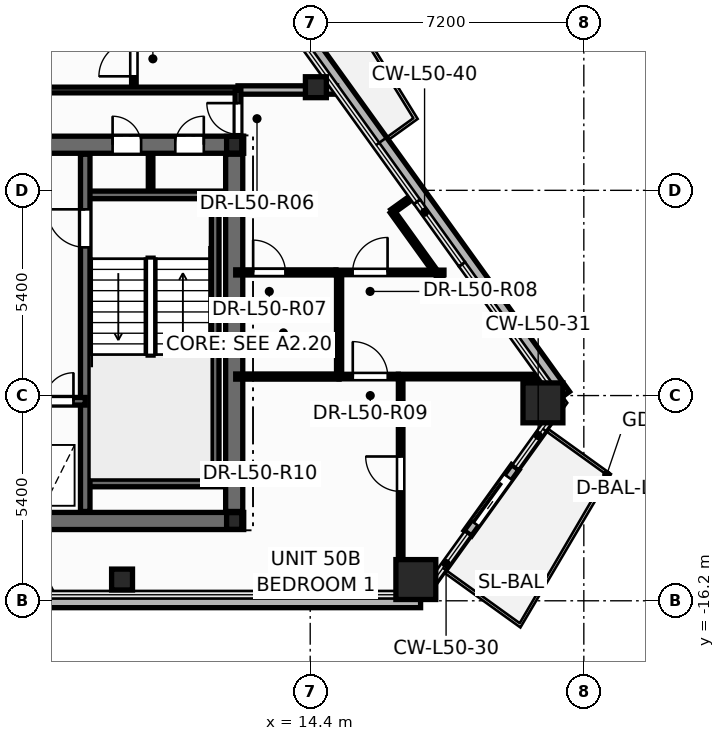
"""IFC4 building model, lengths in metres.
Left out: names, types, materials, properties, quantities, classifications, styles, units other than length and angle.
Written with IfcOpenShell. Run it as: python <this file> out.ifc"""

import sys

from ifc_helpers import new_model, si_unit, direction, frame, frame_2d, origin, origin_2d, place, context, subcontext, project, spatial, rectangle, hollow_rectangle, hollow_circle, i_section, extrude, element, fill, save


model = new_model("IFC4")
c1 = context("Model", 3, precision=1e-05, world=origin(), true_north=direction((0.0, 1.0)))
c2 = subcontext(c1, "Body", "Model", "MODEL_VIEW")
j1 = project(units=[si_unit("LENGTHUNIT", "METRE"), si_unit("PLANEANGLEUNIT", "RADIAN")], contexts=[c1])
p1 = place(None, origin())
s1 = spatial("IfcSite", under=j1, at=p1, CompositionType="ELEMENT")
p2 = place(p1, origin())
s2 = spatial("IfcBuilding", under=s1, at=p2, CompositionType="ELEMENT")
p3 = place(p2, frame((0.0, 0.0, 192.9)))
s3 = spatial("IfcBuildingStorey", under=s2, at=p3, CompositionType="ELEMENT", Elevation=192.9)
for number, where, z_axis, x_axis in (
    (1, (17.18, -15.641, 0.0), (0.0, 0.0, 1.0), (1.0, 0.0, 0.0)),
    (2, (20.524, -10.992, 0.0), (0.0, 0.0, 1.0), (1.0, 0.0, 0.0)),
):
    element("IfcColumn", number, at=place(p3, frame(where, z_axis=z_axis, x_axis=x_axis)), inside=s3, PredefinedType="COLUMN", context=c2, shape_type="SweptSolid", body=[
        extrude(hollow_rectangle(XDim=1.05, YDim=1.05, WallThickness=0.045, at=origin_2d()), origin(), (0.0, 0.0, 1.0), 3.6),
    ])
for number, where, z_axis, x_axis in (
    (3, (9.449, -15.641, 0.0), (0.0, 0.0, 1.0), (1.0, 0.0, 0.0)),
    (4, (14.549, -2.686, 0.0), (0.0, 0.0, 1.0), (1.0, 0.0, 0.0)),
):
    element("IfcColumn", number, at=place(p3, frame(where, z_axis=z_axis, x_axis=x_axis)), inside=s3, PredefinedType="COLUMN", context=c2, shape_type="SweptSolid", body=[
        extrude(hollow_circle(Radius=0.275, WallThickness=0.024, at=origin_2d()), origin(), (0.0, 0.0, 1.0), 3.6),
    ])
for number, where, z_axis, x_axis in (
    (5, (12.4, -14.1, 0.0), (0.0, 0.0, 1.0), (1.0, 0.0, 0.0)),
    (6, (12.4, -4.2, 0.0), (0.0, 0.0, 1.0), (1.0, 0.0, 0.0)),
):
    element("IfcColumn", number, at=place(p3, frame(where, z_axis=z_axis, x_axis=x_axis)), inside=s3, PredefinedType="COLUMN", context=c2, shape_type="SweptSolid", body=[
        extrude(i_section(OverallWidth=0.4, OverallDepth=0.44, WebThickness=0.028, FlangeThickness=0.04, at=origin_2d()), origin(), (0.0, 0.0, 1.0), 3.6),
    ])
p4 = place(p3, frame((-17.305, -16.201, -0.2), z_axis=(0.0, 0.0, 1.0), x_axis=(1.0, 0.0, 0.0)))
e7 = element("IfcWall", 7, at=p4, inside=s3, PredefinedType="PARAPET", context=c2, shape_type="SweptSolid", body=[
    extrude(rectangle(XDim=34.609, YDim=0.36, at=frame_2d((17.305, 0.0))), origin(), (0.0, 0.0, 1.0), 0.38),
])
p5 = place(p3, frame((21.077, -10.801, -0.2), z_axis=(0.0, 0.0, 1.0), x_axis=(-0.583976071479, 0.811770871576, 0.0)))
e8 = element("IfcWall", 8, at=p5, inside=s3, PredefinedType="PARAPET", context=c2, shape_type="SweptSolid", body=[
    extrude(rectangle(XDim=12.115, YDim=0.36, at=frame_2d((6.058, 0.0))), origin(), (0.0, 0.0, 1.0), 0.38),
])
p6 = place(p3, frame((18.548, -14.424, -0.015), z_axis=(0.0, 0.0, 1.0), x_axis=(0.583965085393, 0.811778774693, 0.0)))
e9 = element("IfcWall", 9, at=p6, inside=s3, PredefinedType="STANDARD", context=c2, shape_type="SweptSolid", body=[
    extrude(rectangle(XDim=2.14, YDim=0.24, at=frame_2d((1.07, 0.0))), origin(), (0.0, 0.0, 1.0), 2.807),
])
p7 = place(p6, frame((0.32, 0.0, 0.015)))
e10 = element("IfcOpeningElement", 10, at=p7, cuts=e9, PredefinedType="OPENING", context=c2, shape_type="SweptSolid", body=[
    extrude(rectangle(XDim=1.506, YDim=2.204, at=frame_2d((0.75, 1.102))), frame((0.0, 0.13, 0.0), z_axis=(0.0, -1.0, 0.0), x_axis=(1.0, 0.0, 0.0)), (0.0, 0.0, 1.0), 0.26),
])
p8 = place(p3, frame((10.2, -5.52, 0.0), z_axis=(0.0, 0.0, 1.0), x_axis=(0.0, 1.0, 0.0)))
e11 = element("IfcWall", 11, at=p8, inside=s3, PredefinedType="PARTITIONING", context=c2, shape_type="SweptSolid", body=[
    extrude(rectangle(XDim=1.12, YDim=0.12, at=frame_2d((0.56, 0.0))), origin(), (0.0, 0.0, 1.0), 3.35),
])
p9 = place(p3, frame((-12.65, -14.1, 0.0), z_axis=(0.0, 0.0, 1.0), x_axis=(1.0, 0.0, 0.0)))
e12 = element("IfcWall", 12, at=p9, inside=s3, PredefinedType="SHEAR", context=c2, shape_type="SweptSolid", body=[
    extrude(rectangle(XDim=25.3, YDim=0.45, at=frame_2d((12.65, 0.0))), origin(), (0.0, 0.0, 1.0), 3.6),
])
p10 = place(p3, frame((-12.65, -4.2, 0.0), z_axis=(0.0, 0.0, 1.0), x_axis=(1.0, 0.0, 0.0)))
e13 = element("IfcWall", 13, at=p10, inside=s3, PredefinedType="SHEAR", context=c2, shape_type="SweptSolid", body=[
    extrude(rectangle(XDim=25.3, YDim=0.45, at=frame_2d((12.65, 0.0))), origin(), (0.0, 0.0, 1.0), 3.6),
])
p11 = place(p10, frame((0.95, 0.0, 0.0)))
e14 = element("IfcOpeningElement", 14, at=p11, cuts=e13, PredefinedType="OPENING", context=c2, shape_type="SweptSolid", body=[
    extrude(rectangle(XDim=0.756, YDim=2.054, at=frame_2d((0.375, 1.027))), frame((0.0, 0.235, 0.0), z_axis=(0.0, -1.0, 0.0), x_axis=(1.0, 0.0, 0.0)), (0.0, 0.0, 1.0), 0.47),
])
p12 = place(p10, frame((2.6, 0.0, 0.0)))
e15 = element("IfcOpeningElement", 15, at=p12, cuts=e13, PredefinedType="OPENING", context=c2, shape_type="SweptSolid", body=[
    extrude(rectangle(XDim=0.756, YDim=2.054, at=frame_2d((0.375, 1.027))), frame((0.0, 0.235, 0.0), z_axis=(0.0, -1.0, 0.0), x_axis=(1.0, 0.0, 0.0)), (0.0, 0.0, 1.0), 0.47),
])
p13 = place(p10, frame((21.85, 0.0, 0.0)))
e16 = element("IfcOpeningElement", 16, at=p13, cuts=e13, PredefinedType="OPENING", context=c2, shape_type="SweptSolid", body=[
    extrude(rectangle(XDim=0.756, YDim=2.054, at=frame_2d((0.375, 1.027))), frame((0.0, 0.235, 0.0), z_axis=(0.0, -1.0, 0.0), x_axis=(1.0, 0.0, 0.0)), (0.0, 0.0, 1.0), 0.47),
])
p14 = place(p10, frame((23.5, 0.0, 0.0)))
e17 = element("IfcOpeningElement", 17, at=p14, cuts=e13, PredefinedType="OPENING", context=c2, shape_type="SweptSolid", body=[
    extrude(rectangle(XDim=0.756, YDim=2.054, at=frame_2d((0.375, 1.027))), frame((0.0, 0.235, 0.0), z_axis=(0.0, -1.0, 0.0), x_axis=(1.0, 0.0, 0.0)), (0.0, 0.0, 1.0), 0.47),
])
p15 = place(p10, frame((5.85, 0.0, 0.0)))
e18 = element("IfcOpeningElement", 18, at=p15, cuts=e13, PredefinedType="OPENING", context=c2, shape_type="SweptSolid", body=[
    extrude(rectangle(XDim=1.006, YDim=2.104, at=frame_2d((0.5, 1.052))), frame((0.0, 0.235, 0.0), z_axis=(0.0, -1.0, 0.0), x_axis=(1.0, 0.0, 0.0)), (0.0, 0.0, 1.0), 0.47),
])
p16 = place(p10, frame((10.35, 0.0, 0.0)))
e19 = element("IfcOpeningElement", 19, at=p16, cuts=e13, PredefinedType="OPENING", context=c2, shape_type="SweptSolid", body=[
    extrude(rectangle(XDim=1.406, YDim=2.154, at=frame_2d((0.7, 1.077))), frame((0.0, 0.235, 0.0), z_axis=(0.0, -1.0, 0.0), x_axis=(1.0, 0.0, 0.0)), (0.0, 0.0, 1.0), 0.47),
])
p17 = place(p10, frame((18.45, 0.0, 0.0)))
e20 = element("IfcOpeningElement", 20, at=p17, cuts=e13, PredefinedType="OPENING", context=c2, shape_type="SweptSolid", body=[
    extrude(rectangle(XDim=1.006, YDim=2.104, at=frame_2d((0.5, 1.052))), frame((0.0, 0.235, 0.0), z_axis=(0.0, -1.0, 0.0), x_axis=(1.0, 0.0, 0.0)), (0.0, 0.0, 1.0), 0.47),
])
for number, where, z_axis, x_axis in (
    (21, (8.48, -5.52, 0.0), (0.0, 0.0, 1.0), (1.0, 0.0, 0.0)),
    (22, (8.48, -13.1, 0.0), (0.0, 0.0, 1.0), (1.0, 0.0, 0.0)),
):
    element("IfcWall", number, at=place(p3, frame(where, z_axis=z_axis, x_axis=x_axis)), inside=s3, PredefinedType="SOLIDWALL", context=c2, shape_type="SweptSolid", body=[
        extrude(rectangle(XDim=3.87, YDim=0.2, at=frame_2d((1.935, 0.0))), origin(), (0.0, 0.0, 1.0), 3.6),
    ])
p18 = place(p3, frame((11.9, -13.1, 0.0), z_axis=(0.0, 0.0, 1.0), x_axis=(0.0, 1.0, 0.0)))
e23 = element("IfcWall", 23, at=p18, inside=s3, PredefinedType="SOLIDWALL", context=c2, shape_type="SweptSolid", body=[
    extrude(rectangle(XDim=7.58, YDim=0.2, at=frame_2d((3.79, 0.0))), origin(), (0.0, 0.0, 1.0), 3.6),
])
p19 = place(p3, frame((8.48, -13.85, 0.0), z_axis=(0.0, 0.0, 1.0), x_axis=(0.0, 1.0, 0.0)))
e24 = element("IfcWall", 24, at=p19, inside=s3, PredefinedType="SHEAR", context=c2, shape_type="SweptSolid", body=[
    extrude(rectangle(XDim=9.4, YDim=0.25, at=frame_2d((4.7, 0.0))), origin(), (0.0, 0.0, 1.0), 3.6),
])
p20 = place(p19, frame((6.95, 0.0, 0.0)))
e25 = element("IfcOpeningElement", 25, at=p20, cuts=e24, PredefinedType="OPENING", context=c2, shape_type="SweptSolid", body=[
    extrude(rectangle(XDim=1.006, YDim=2.104, at=frame_2d((0.5, 1.052))), frame((0.0, 0.135, 0.0), z_axis=(0.0, -1.0, 0.0), x_axis=(1.0, 0.0, 0.0)), (0.0, 0.0, 1.0), 0.27),
])
p21 = place(p3, frame((5.12, -10.95, 0.0), z_axis=(0.0, 0.0, 1.0), x_axis=(1.0, 0.0, 0.0)))
e26 = element("IfcWall", 26, at=p21, inside=s3, PredefinedType="SOLIDWALL", context=c2, shape_type="SweptSolid", body=[
    extrude(rectangle(XDim=3.36, YDim=0.2, at=frame_2d((1.68, 0.0))), origin(), (0.0, 0.0, 1.0), 3.6),
])
p22 = place(p21, frame((0.42, 0.0, 0.0)))
e27 = element("IfcOpeningElement", 27, at=p22, cuts=e26, PredefinedType="OPENING", context=c2, shape_type="SweptSolid", body=[
    extrude(rectangle(XDim=1.106, YDim=2.104, at=frame_2d((0.55, 1.052))), frame((0.0, 0.11, 0.0), z_axis=(0.0, -1.0, 0.0), x_axis=(1.0, 0.0, 0.0)), (0.0, 0.0, 1.0), 0.22),
])
p23 = place(p21, frame((2.3, 0.0, 0.0)))
e28 = element("IfcOpeningElement", 28, at=p23, cuts=e26, PredefinedType="OPENING", context=c2, shape_type="SweptSolid", body=[
    extrude(rectangle(XDim=0.756, YDim=2.054, at=frame_2d((0.375, 1.027))), frame((0.0, 0.11, 0.0), z_axis=(0.0, -1.0, 0.0), x_axis=(1.0, 0.0, 0.0)), (0.0, 0.0, 1.0), 0.22),
])
p24 = place(p3, frame((12.4, -13.85, 0.0), z_axis=(0.0, 0.0, 1.0), x_axis=(0.0, 1.0, 0.0)))
e29 = element("IfcWall", 29, at=p24, inside=s3, PredefinedType="SHEAR", context=c2, shape_type="SweptSolid", body=[
    extrude(rectangle(XDim=9.4, YDim=0.45, at=frame_2d((4.7, 0.0))), origin(), (0.0, 0.0, 1.0), 3.6),
])
p25 = place(p3, frame((9.76, -2.76, 0.0), z_axis=(0.0, 0.0, 1.0), x_axis=(0.0, 1.0, 0.0)))
e30 = element("IfcWall", 30, at=p25, inside=s3, PredefinedType="PARTITIONING", context=c2, shape_type="SweptSolid", body=[
    extrude(rectangle(XDim=7.416, YDim=0.12, at=frame_2d((3.708, 0.0))), origin(), (0.0, 0.0, 1.0), 2.625),
])
p26 = place(p25, frame((0.36, 0.0, 0.0)))
e31 = element("IfcOpeningElement", 31, at=p26, cuts=e30, PredefinedType="OPENING", context=c2, shape_type="SweptSolid", body=[
    extrude(rectangle(XDim=0.926, YDim=2.104, at=frame_2d((0.46, 1.052))), frame((0.0, 0.07, 0.0), z_axis=(0.0, -1.0, 0.0), x_axis=(1.0, 0.0, 0.0)), (0.0, 0.0, 1.0), 0.14),
])
p27 = place(p3, frame((16.78, -16.041, 0.0), z_axis=(0.0, 0.0, 1.0), x_axis=(0.0, 1.0, 0.0)))
e32 = element("IfcWall", 32, at=p27, inside=s3, PredefinedType="PARTITIONING", context=c2, shape_type="SweptSolid", body=[
    extrude(rectangle(XDim=5.741, YDim=0.12, at=frame_2d((2.871, 0.0))), origin(), (0.0, 0.0, 1.0), 2.792),
])
p28 = place(p27, frame((2.718, 0.0, 0.0)))
e33 = element("IfcOpeningElement", 33, at=p28, cuts=e32, PredefinedType="OPENING", context=c2, shape_type="SweptSolid", body=[
    extrude(rectangle(XDim=0.926, YDim=2.104, at=frame_2d((0.46, 1.052))), frame((0.0, 0.07, 0.0), z_axis=(0.0, -1.0, 0.0), x_axis=(1.0, 0.0, 0.0)), (0.0, 0.0, 1.0), 0.14),
])
p29 = place(p3, frame((-4.318, -2.76, 0.0), z_axis=(0.0, 0.0, 1.0), x_axis=(1.0, 0.0, 0.0)))
e34 = element("IfcWall", 34, at=p29, inside=s3, PredefinedType="PARTITIONING", context=c2, shape_type="SweptSolid", body=[
    extrude(rectangle(XDim=16.818, YDim=0.15, at=frame_2d((8.409, 0.0))), origin(), (0.0, 0.0, 1.0), 2.325),
])
p30 = place(p3, frame((16.72, -10.3, 0.0), z_axis=(0.0, 0.0, 1.0), x_axis=(1.0, 0.0, 0.0)))
e35 = element("IfcWall", 35, at=p30, inside=s3, PredefinedType="PARTITIONING", context=c2, shape_type="SweptSolid", body=[
    extrude(rectangle(XDim=3.799, YDim=0.12, at=frame_2d((1.899, 0.0))), origin(), (0.0, 0.0, 1.0), 2.325),
])
p31 = place(p3, frame((15.08, -7.56, 0.0), z_axis=(0.0, 0.0, 1.0), x_axis=(1.0, 0.0, 0.0)))
e36 = element("IfcWall", 36, at=p31, inside=s3, PredefinedType="PARTITIONING", context=c2, shape_type="SweptSolid", body=[
    extrude(rectangle(XDim=2.84, YDim=0.12, at=frame_2d((1.42, 0.0))), origin(), (0.0, 0.0, 1.0), 2.325),
])
p32 = place(p31, frame((0.436, 0.0, 0.0)))
e37 = element("IfcOpeningElement", 37, at=p32, cuts=e36, PredefinedType="OPENING", context=c2, shape_type="SweptSolid", body=[
    extrude(rectangle(XDim=0.926, YDim=2.104, at=frame_2d((0.46, 1.052))), frame((0.0, 0.07, 0.0), z_axis=(0.0, -1.0, 0.0), x_axis=(1.0, 0.0, 0.0)), (0.0, 0.0, 1.0), 0.14),
])
p33 = place(p3, frame((12.44, -7.56, 0.0), z_axis=(0.0, 0.0, 1.0), x_axis=(1.0, 0.0, 0.0)))
e38 = element("IfcWall", 38, at=p33, inside=s3, PredefinedType="PARTITIONING", context=c2, shape_type="SweptSolid", body=[
    extrude(rectangle(XDim=2.638, YDim=0.135, at=frame_2d((1.319, 0.0))), origin(), (0.0, 0.0, 1.0), 2.792),
])
p34 = place(p33, frame((0.458, 0.0, 0.0)))
e39 = element("IfcOpeningElement", 39, at=p34, cuts=e38, PredefinedType="OPENING", context=c2, shape_type="SweptSolid", body=[
    extrude(rectangle(XDim=0.856, YDim=2.104, at=frame_2d((0.425, 1.052))), frame((0.0, 0.078, 0.0), z_axis=(0.0, -1.0, 0.0), x_axis=(1.0, 0.0, 0.0)), (0.0, 0.0, 1.0), 0.155),
])
p35 = place(p3, frame((15.16, -10.3, 0.0), z_axis=(0.0, 0.0, 1.0), x_axis=(0.0, 1.0, 0.0)))
e40 = element("IfcWall", 40, at=p35, inside=s3, PredefinedType="PARTITIONING", context=c2, shape_type="SweptSolid", body=[
    extrude(rectangle(XDim=2.74, YDim=0.135, at=frame_2d((1.37, 0.0))), origin(), (0.0, 0.0, 1.0), 3.35),
])
p36 = place(p3, frame((12.44, -10.3, 0.0), z_axis=(0.0, 0.0, 1.0), x_axis=(1.0, 0.0, 0.0)))
e41 = element("IfcWall", 41, at=p36, inside=s3, PredefinedType="PARTITIONING", context=c2, shape_type="SweptSolid", body=[
    extrude(rectangle(XDim=2.72, YDim=0.135, at=frame_2d((1.36, 0.0))), origin(), (0.0, 0.0, 1.0), 2.792),
])
p37 = place(p3, frame((12.5, -2.76, 0.0), z_axis=(0.0, 0.0, 1.0), x_axis=(1.0, 0.0, 0.0)))
e42 = element("IfcWall", 42, at=p37, inside=s3, PredefinedType="PARTITIONING", context=c2, shape_type="SweptSolid", body=[
    extrude(rectangle(XDim=2.595, YDim=0.22, at=frame_2d((1.297, 0.0))), origin(), (0.0, 0.0, 1.0), 2.625),
])
p38 = place(p3, frame((17.945, -7.886, 0.0), z_axis=(0.0, 0.0, 1.0), x_axis=(-0.583963896956, 0.811779629611, 0.0)))
e43 = element("IfcWall", 43, at=p38, inside=s3, PredefinedType="PARTITIONING", context=c2, shape_type="SweptSolid", body=[
    extrude(rectangle(XDim=2.378, YDim=0.12, at=frame_2d((1.189, 0.0))), origin(), (0.0, 0.0, 1.0), 3.35),
])
p39 = place(p3, frame((15.16, -10.3, 0.0), z_axis=(0.0, 0.0, 1.0), x_axis=(1.0, 0.0, 0.0)))
e44 = element("IfcWall", 44, at=p39, inside=s3, PredefinedType="PARTITIONING", context=c2, shape_type="SweptSolid", body=[
    extrude(rectangle(XDim=1.558, YDim=0.12, at=frame_2d((0.779, 0.0))), origin(), (0.0, 0.0, 1.0), 3.35),
])
p40 = place(p39, frame((0.36, 0.0, 0.0)))
e45 = element("IfcOpeningElement", 45, at=p40, cuts=e44, PredefinedType="OPENING", context=c2, shape_type="SweptSolid", body=[
    extrude(rectangle(XDim=0.926, YDim=2.104, at=frame_2d((0.46, 1.052))), frame((0.0, 0.07, 0.0), z_axis=(0.0, -1.0, 0.0), x_axis=(1.0, 0.0, 0.0)), (0.0, 0.0, 1.0), 0.14),
])
p41 = place(p3, frame((12.5, -4.24, 0.0), z_axis=(0.0, 0.0, 1.0), x_axis=(0.0, 1.0, 0.0)))
e46 = element("IfcWall", 46, at=p41, inside=s3, PredefinedType="PARTITIONING", context=c2, shape_type="SweptSolid", body=[
    extrude(rectangle(XDim=1.48, YDim=0.15, at=frame_2d((0.74, 0.0))), origin(), (0.0, 0.0, 1.0), 2.325),
])
p42 = place(p41, frame((0.315, 0.0, 0.0)))
e47 = element("IfcOpeningElement", 47, at=p42, cuts=e46, PredefinedType="OPENING", context=c2, shape_type="SweptSolid", body=[
    extrude(rectangle(XDim=0.826, YDim=2.104, at=frame_2d((0.41, 1.052))), frame((0.0, 0.085, 0.0), z_axis=(0.0, -1.0, 0.0), x_axis=(1.0, 0.0, 0.0)), (0.0, 0.0, 1.0), 0.17),
])
p43 = place(p3, frame((18.824, -7.961, 0.0), z_axis=(0.0, 0.0, 1.0), x_axis=(-0.996387556444, 0.084922537432, 0.0)))
e48 = element("IfcWall", 48, at=p43, inside=s3, PredefinedType="PARTITIONING", context=c2, shape_type="SweptSolid", body=[
    extrude(rectangle(XDim=0.883, YDim=0.12, at=frame_2d((0.441, 0.0))), origin(), (0.0, 0.0, 1.0), 2.792),
])
p44 = place(p3, frame((7.238, -15.361, 0.0), z_axis=(0.0, 0.0, 1.0), x_axis=(0.450593916723, -0.892729030676, 0.0)))
e49 = element("IfcWall", 49, at=p44, inside=s3, PredefinedType="PARTITIONING", context=c2, shape_type="SweptSolid", body=[
    extrude(rectangle(XDim=0.75, YDim=0.12, at=frame_2d((0.375, 0.0))), origin(), (0.0, 0.0, 1.0), 2.792),
])
p45 = place(p3, frame((16.556, -5.956, 0.0), z_axis=(0.0, 0.0, 1.0), x_axis=(0.811907418628, 0.583786213932, 0.0)))
e50 = element("IfcWall", 50, at=p45, inside=s3, PredefinedType="PARTITIONING", context=c2, shape_type="SweptSolid", body=[
    extrude(rectangle(XDim=0.67, YDim=0.12, at=frame_2d((0.335, 0.0))), origin(), (0.0, 0.0, 1.0), 2.792),
])
p46 = place(p7, origin())
e51 = element("IfcDoor", 51, at=p46, inside=s3, OperationType="SLIDING_TO_RIGHT", PredefinedType="DOOR", context=c2, shape_type="SweptSolid", body=[
    extrude(rectangle(XDim=1.5, YDim=2.2, at=frame_2d((0.75, 1.1))), frame((0.0, 0.025, 0.0), z_axis=(0.0, -1.0, 0.0), x_axis=(1.0, 0.0, 0.0)), (0.0, 0.0, 1.0), 0.05),
])
fill(e10, e51)
p47 = place(p20, origin())
e52 = element("IfcDoor", 52, at=p47, inside=s3, OperationType="SINGLE_SWING_RIGHT", PredefinedType="DOOR", context=c2, shape_type="SweptSolid", body=[
    extrude(rectangle(XDim=1.0, YDim=2.1, at=frame_2d((0.5, 1.05))), frame((0.0, 0.025, 0.0), z_axis=(0.0, -1.0, 0.0), x_axis=(1.0, 0.0, 0.0)), (0.0, 0.0, 1.0), 0.05),
])
fill(e25, e52)
p48 = place(p23, origin())
e53 = element("IfcDoor", 53, at=p48, inside=s3, OperationType="SINGLE_SWING_RIGHT", PredefinedType="DOOR", context=c2, shape_type="SweptSolid", body=[
    extrude(rectangle(XDim=0.75, YDim=2.05, at=frame_2d((0.375, 1.025))), frame((0.0, 0.025, 0.0), z_axis=(0.0, -1.0, 0.0), x_axis=(1.0, 0.0, 0.0)), (0.0, 0.0, 1.0), 0.05),
])
fill(e28, e53)
p49 = place(p13, origin())
e54 = element("IfcDoor", 54, at=p49, inside=s3, OperationType="SINGLE_SWING_LEFT", PredefinedType="DOOR", context=c2, shape_type="SweptSolid", body=[
    extrude(rectangle(XDim=0.75, YDim=2.05, at=frame_2d((0.375, 1.025))), frame((0.0, 0.025, 0.0), z_axis=(0.0, -1.0, 0.0), x_axis=(1.0, 0.0, 0.0)), (0.0, 0.0, 1.0), 0.05),
])
fill(e16, e54)
p50 = place(p14, origin())
e55 = element("IfcDoor", 55, at=p50, inside=s3, OperationType="SINGLE_SWING_RIGHT", PredefinedType="DOOR", context=c2, shape_type="SweptSolid", body=[
    extrude(rectangle(XDim=0.75, YDim=2.05, at=frame_2d((0.375, 1.025))), frame((0.0, 0.025, 0.0), z_axis=(0.0, -1.0, 0.0), x_axis=(1.0, 0.0, 0.0)), (0.0, 0.0, 1.0), 0.05),
])
fill(e17, e55)
p51 = place(p42, origin())
e56 = element("IfcDoor", 56, at=p51, inside=s3, OperationType="SINGLE_SWING_RIGHT", PredefinedType="DOOR", context=c2, shape_type="SweptSolid", body=[
    extrude(rectangle(XDim=0.82, YDim=2.1, at=frame_2d((0.41, 1.05))), frame((0.0, 0.025, 0.0), z_axis=(0.0, -1.0, 0.0), x_axis=(1.0, 0.0, 0.0)), (0.0, 0.0, 1.0), 0.05),
])
fill(e47, e56)
p52 = place(p34, origin())
e57 = element("IfcDoor", 57, at=p52, inside=s3, OperationType="SINGLE_SWING_LEFT", PredefinedType="DOOR", context=c2, shape_type="SweptSolid", body=[
    extrude(rectangle(XDim=0.85, YDim=2.1, at=frame_2d((0.425, 1.05))), frame((0.0, 0.025, 0.0), z_axis=(0.0, -1.0, 0.0), x_axis=(1.0, 0.0, 0.0)), (0.0, 0.0, 1.0), 0.05),
])
fill(e39, e57)
p53 = place(p32, origin())
e58 = element("IfcDoor", 58, at=p53, inside=s3, OperationType="SINGLE_SWING_RIGHT", PredefinedType="DOOR", context=c2, shape_type="SweptSolid", body=[
    extrude(rectangle(XDim=0.92, YDim=2.1, at=frame_2d((0.46, 1.05))), frame((0.0, 0.025, 0.0), z_axis=(0.0, -1.0, 0.0), x_axis=(1.0, 0.0, 0.0)), (0.0, 0.0, 1.0), 0.05),
])
fill(e37, e58)
p54 = place(p40, origin())
e59 = element("IfcDoor", 59, at=p54, inside=s3, OperationType="SINGLE_SWING_LEFT", PredefinedType="DOOR", context=c2, shape_type="SweptSolid", body=[
    extrude(rectangle(XDim=0.92, YDim=2.1, at=frame_2d((0.46, 1.05))), frame((0.0, 0.025, 0.0), z_axis=(0.0, -1.0, 0.0), x_axis=(1.0, 0.0, 0.0)), (0.0, 0.0, 1.0), 0.05),
])
fill(e45, e59)
p55 = place(p28, origin())
e60 = element("IfcDoor", 60, at=p55, inside=s3, OperationType="SINGLE_SWING_RIGHT", PredefinedType="DOOR", context=c2, shape_type="SweptSolid", body=[
    extrude(rectangle(XDim=0.92, YDim=2.1, at=frame_2d((0.46, 1.05))), frame((0.0, 0.025, 0.0), z_axis=(0.0, -1.0, 0.0), x_axis=(1.0, 0.0, 0.0)), (0.0, 0.0, 1.0), 0.05),
])
fill(e33, e60)
p56 = place(p26, origin())
e61 = element("IfcDoor", 61, at=p56, inside=s3, OperationType="SINGLE_SWING_LEFT", PredefinedType="DOOR", context=c2, shape_type="SweptSolid", body=[
    extrude(rectangle(XDim=0.92, YDim=2.1, at=frame_2d((0.46, 1.05))), frame((0.0, 0.025, 0.0), z_axis=(0.0, -1.0, 0.0), x_axis=(1.0, 0.0, 0.0)), (0.0, 0.0, 1.0), 0.05),
])
fill(e31, e61)
save(model, sys.argv[1])
